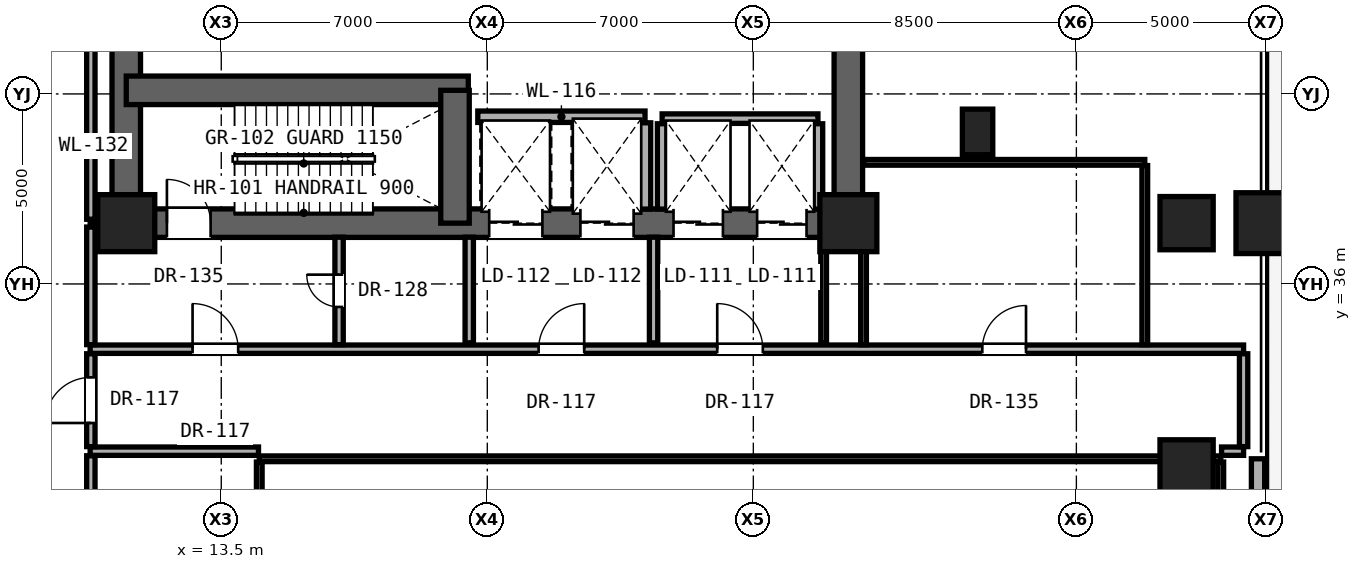
"""IFC4 building model, lengths in metres.
Left out: names, types, materials, properties, quantities, classifications, styles, units other than length and angle.
Written with IfcOpenShell. Run it as: python <this file> out.ifc"""

import sys

from ifc_helpers import new_model, si_unit, direction, frame, frame_2d, origin, origin_2d, place, context, subcontext, project, spatial, rectangle, hollow_rectangle, extrude, element, fill, save


model = new_model("IFC4")
c1 = context("Model", 3, precision=1e-05, world=origin(), true_north=direction((0.0, 1.0)))
c2 = subcontext(c1, "Body", "Model", "MODEL_VIEW")
j1 = project(units=[si_unit("LENGTHUNIT", "METRE"), si_unit("PLANEANGLEUNIT", "RADIAN")], contexts=[c1])
p1 = place(None, origin())
s1 = spatial("IfcSite", under=j1, at=p1, CompositionType="ELEMENT")
p2 = place(p1, origin())
s2 = spatial("IfcBuilding", under=s1, at=p2, CompositionType="ELEMENT")
p3 = place(p2, origin())
s3 = spatial("IfcBuildingStorey", under=s2, at=p3, CompositionType="ELEMENT", Elevation=0.0)
for number, where, z_axis, x_axis in (
    (1, (11.0, 37.6, 0.0), (0.0, 0.0, 1.0), (1.0, 0.0, 0.0)),
    (2, (30.0, 37.6, 0.0), (0.0, 0.0, 1.0), (1.0, 0.0, 0.0)),
):
    element("IfcColumn", number, at=place(p3, frame(where, z_axis=z_axis, x_axis=x_axis)), inside=s3, PredefinedType="COLUMN", context=c2, shape_type="SweptSolid", body=[
        extrude(rectangle(XDim=1.5, YDim=1.5, at=origin_2d()), origin(), (0.0, 0.0, 1.0), 5.2),
    ])
for number, where, z_axis, x_axis in (
    (3, (38.9, 31.2, 0.0), (0.0, 0.0, 1.0), (1.0, 0.0, 0.0)),
    (4, (38.9, 37.6, 0.0), (0.0, 0.0, 1.0), (1.0, 0.0, 0.0)),
):
    element("IfcColumn", number, at=place(p3, frame(where, z_axis=z_axis, x_axis=x_axis)), inside=s3, PredefinedType="COLUMN", context=c2, shape_type="SweptSolid", body=[
        extrude(hollow_rectangle(XDim=1.4, YDim=1.4, WallThickness=0.08, at=origin_2d()), origin(), (0.0, 0.0, 1.0), 5.2),
    ])
p4 = place(p3, frame((33.4, 40.0, 0.0), z_axis=(0.0, 0.0, 1.0), x_axis=(1.0, 0.0, 0.0)))
e5 = element("IfcColumn", 5, at=p4, inside=s3, PredefinedType="PILASTER", context=c2, shape_type="SweptSolid", body=[
    extrude(rectangle(XDim=0.8, YDim=1.2, at=origin_2d()), origin(), (0.0, 0.0, 1.0), 5.2),
])
for number, where, z_axis, x_axis in (
    (6, (11.0, 37.6, 0.0), (0.0, 0.0, 1.0), (0.0, 1.0, 0.0)),
    (7, (30.0, 37.6, 0.0), (0.0, 0.0, 1.0), (0.0, 1.0, 0.0)),
):
    element("IfcWall", number, at=place(p3, frame(where, z_axis=z_axis, x_axis=x_axis)), inside=s3, PredefinedType="SHEAR", context=c2, shape_type="SweptSolid", body=[
        extrude(rectangle(XDim=6.0, YDim=0.75, at=frame_2d((3.0, 0.0))), origin(), (0.0, 0.0, 1.0), 4.88),
    ])
p5 = place(p3, frame((11.0, 37.6, 0.0), z_axis=(0.0, 0.0, 1.0), x_axis=(1.0, 0.0, 0.0)))
e8 = element("IfcWall", 8, at=p5, inside=s3, PredefinedType="SHEAR", context=c2, shape_type="SweptSolid", body=[
    extrude(rectangle(XDim=19.0, YDim=0.75, at=frame_2d((9.5, 0.0))), origin(), (0.0, 0.0, 1.0), 4.88),
])
p6 = place(p5, frame((1.07, 0.0, 0.0)))
e9 = element("IfcOpeningElement", 9, at=p6, cuts=e8, PredefinedType="OPENING", context=c2, shape_type="SweptSolid", body=[
    extrude(rectangle(XDim=1.15, YDim=2.2, at=frame_2d((0.575, 1.1))), frame((0.0, 0.385, 0.0), z_axis=(0.0, -1.0, 0.0), x_axis=(1.0, 0.0, 0.0)), (0.0, 0.0, 1.0), 0.77),
])
p7 = place(p5, frame((9.55, 0.0, 0.0)))
e10 = element("IfcOpeningElement", 10, at=p7, cuts=e8, PredefinedType="OPENING", context=c2, shape_type="SweptSolid", body=[
    extrude(rectangle(XDim=1.4, YDim=2.35, at=frame_2d((0.7, 1.175))), frame((0.0, 0.385, 0.0), z_axis=(0.0, -1.0, 0.0), x_axis=(1.0, 0.0, 0.0)), (0.0, 0.0, 1.0), 0.77),
])
p8 = place(p5, frame((11.95, 0.0, 0.0)))
e11 = element("IfcOpeningElement", 11, at=p8, cuts=e8, PredefinedType="OPENING", context=c2, shape_type="SweptSolid", body=[
    extrude(rectangle(XDim=1.4, YDim=2.35, at=frame_2d((0.7, 1.175))), frame((0.0, 0.385, 0.0), z_axis=(0.0, -1.0, 0.0), x_axis=(1.0, 0.0, 0.0)), (0.0, 0.0, 1.0), 0.77),
])
p9 = place(p5, frame((14.4, 0.0, 0.0)))
e12 = element("IfcOpeningElement", 12, at=p9, cuts=e8, PredefinedType="OPENING", context=c2, shape_type="SweptSolid", body=[
    extrude(rectangle(XDim=1.3, YDim=2.3, at=frame_2d((0.65, 1.15))), frame((0.0, 0.385, 0.0), z_axis=(0.0, -1.0, 0.0), x_axis=(1.0, 0.0, 0.0)), (0.0, 0.0, 1.0), 0.77),
])
p10 = place(p5, frame((16.6, 0.0, 0.0)))
e13 = element("IfcOpeningElement", 13, at=p10, cuts=e8, PredefinedType="OPENING", context=c2, shape_type="SweptSolid", body=[
    extrude(rectangle(XDim=1.3, YDim=2.3, at=frame_2d((0.65, 1.15))), frame((0.0, 0.385, 0.0), z_axis=(0.0, -1.0, 0.0), x_axis=(1.0, 0.0, 0.0)), (0.0, 0.0, 1.0), 0.77),
])
p11 = place(p3, frame((11.0, 41.095, 0.0), z_axis=(0.0, 0.0, 1.0), x_axis=(1.0, 0.0, 0.0)))
e14 = element("IfcWall", 14, at=p11, inside=s3, PredefinedType="SHEAR", context=c2, shape_type="SweptSolid", body=[
    extrude(rectangle(XDim=9.0, YDim=0.75, at=frame_2d((4.5, 0.0))), origin(), (0.0, 0.0, 1.0), 4.88),
])
p12 = place(p3, frame((19.65, 37.6, 0.0), z_axis=(0.0, 0.0, 1.0), x_axis=(0.0, 1.0, 0.0)))
e15 = element("IfcWall", 15, at=p12, inside=s3, PredefinedType="SHEAR", context=c2, shape_type="SweptSolid", body=[
    extrude(rectangle(XDim=3.495, YDim=0.75, at=frame_2d((1.748, 0.0))), origin(), (0.0, 0.0, 1.0), 4.88),
])
p13 = place(p3, frame((41.0, 37.6, 0.0), z_axis=(0.0, 0.0, 1.0), x_axis=(1.0, 0.0, 0.0)))
e16 = element("IfcColumn", 16, at=p13, inside=s3, PredefinedType="COLUMN", context=c2, shape_type="SweptSolid", body=[
    extrude(rectangle(XDim=1.6, YDim=1.6, at=origin_2d()), origin(), (0.0, 0.0, 1.0), 5.2),
])
p14 = place(p3, frame((40.78, 31.4, 0.0), z_axis=(0.0, 0.0, 1.0), x_axis=(0.0, -1.0, 0.0)))
e17 = element("IfcWall", 17, at=p14, inside=s3, PredefinedType="SOLIDWALL", context=c2, shape_type="SweptSolid", body=[
    extrude(rectangle(XDim=10.8, YDim=0.35, at=frame_2d((5.4, 0.0))), origin(), (0.0, 0.0, 1.0), 3.832),
])
p15 = place(p14, frame((2.2, 0.0, 0.0)))
e18 = element("IfcOpeningElement", 18, at=p15, cuts=e17, PredefinedType="OPENING", context=c2, shape_type="SweptSolid", body=[
    extrude(rectangle(XDim=2.4, YDim=2.7, at=frame_2d((1.2, 1.35))), frame((0.0, 0.185, 0.0), z_axis=(0.0, -1.0, 0.0), x_axis=(1.0, 0.0, 0.0)), (0.0, 0.0, 1.0), 0.37),
])
p16 = place(p14, frame((6.8, 0.0, 0.0)))
e19 = element("IfcOpeningElement", 19, at=p16, cuts=e17, PredefinedType="OPENING", context=c2, shape_type="SweptSolid", body=[
    extrude(rectangle(XDim=1.8, YDim=2.5, at=frame_2d((0.9, 1.25))), frame((0.0, 0.185, 0.0), z_axis=(0.0, -1.0, 0.0), x_axis=(1.0, 0.0, 0.0)), (0.0, 0.0, 1.0), 0.37),
])
p17 = place(p3, frame((14.5, 31.4, 0.0), z_axis=(0.0, 0.0, 1.0), x_axis=(1.0, 0.0, 0.0)))
e20 = element("IfcWall", 20, at=p17, inside=s3, PredefinedType="PARTITIONING", context=c2, shape_type="SweptSolid", body=[
    extrude(rectangle(XDim=25.3, YDim=0.15, at=frame_2d((12.65, 0.0))), origin(), (0.0, 0.0, 1.0), 3.832),
])
p18 = place(p3, frame((10.05, 31.6, 0.0), z_axis=(0.0, 0.0, 1.0), x_axis=(1.0, 0.0, 0.0)))
e21 = element("IfcWall", 21, at=p18, inside=s3, PredefinedType="SOLIDWALL", context=c2, shape_type="SweptSolid", body=[
    extrude(rectangle(XDim=4.43, YDim=0.22, at=frame_2d((2.215, 0.0))), origin(), (0.0, 0.0, 1.0), 3.832),
])
p19 = place(p3, frame((39.82, 31.6, 0.0), z_axis=(0.0, 0.0, 1.0), x_axis=(1.0, 0.0, 0.0)))
e22 = element("IfcWall", 22, at=p19, inside=s3, PredefinedType="SOLIDWALL", context=c2, shape_type="SweptSolid", body=[
    extrude(rectangle(XDim=0.58, YDim=0.22, at=frame_2d((0.29, 0.0))), origin(), (0.0, 0.0, 1.0), 4.88),
])
p20 = place(p3, frame((10.05, 34.283, 0.0), z_axis=(0.0, 0.0, 1.0), x_axis=(1.0, 0.0, 0.0)))
e23 = element("IfcWall", 23, at=p20, inside=s3, PredefinedType="SOLIDWALL", context=c2, shape_type="SweptSolid", body=[
    extrude(rectangle(XDim=30.35, YDim=0.22, at=frame_2d((15.175, 0.0))), origin(), (0.0, 0.0, 1.0), 3.832),
])
p21 = place(p20, frame((2.695, 0.0, 0.0)))
e24 = element("IfcOpeningElement", 24, at=p21, cuts=e23, PredefinedType="OPENING", context=c2, shape_type="SweptSolid", body=[
    extrude(rectangle(XDim=1.2, YDim=2.25, at=frame_2d((0.6, 1.125))), frame((0.0, 0.12, 0.0), z_axis=(0.0, -1.0, 0.0), x_axis=(1.0, 0.0, 0.0)), (0.0, 0.0, 1.0), 0.24),
])
p22 = place(p20, frame((11.8, 0.0, 0.0)))
e25 = element("IfcOpeningElement", 25, at=p22, cuts=e23, PredefinedType="OPENING", context=c2, shape_type="SweptSolid", body=[
    extrude(rectangle(XDim=1.2, YDim=2.25, at=frame_2d((0.6, 1.125))), frame((0.0, 0.12, 0.0), z_axis=(0.0, -1.0, 0.0), x_axis=(1.0, 0.0, 0.0)), (0.0, 0.0, 1.0), 0.24),
])
p23 = place(p20, frame((16.5, 0.0, 0.0)))
e26 = element("IfcOpeningElement", 26, at=p23, cuts=e23, PredefinedType="OPENING", context=c2, shape_type="SweptSolid", body=[
    extrude(rectangle(XDim=1.2, YDim=2.25, at=frame_2d((0.6, 1.125))), frame((0.0, 0.12, 0.0), z_axis=(0.0, -1.0, 0.0), x_axis=(1.0, 0.0, 0.0)), (0.0, 0.0, 1.0), 0.24),
])
p24 = place(p20, frame((23.475, 0.0, 0.0)))
e27 = element("IfcOpeningElement", 27, at=p24, cuts=e23, PredefinedType="OPENING", context=c2, shape_type="SweptSolid", body=[
    extrude(rectangle(XDim=1.15, YDim=2.2, at=frame_2d((0.575, 1.1))), frame((0.0, 0.12, 0.0), z_axis=(0.0, -1.0, 0.0), x_axis=(1.0, 0.0, 0.0)), (0.0, 0.0, 1.0), 0.24),
])
p25 = place(p3, frame((10.05, 37.6, 0.0), z_axis=(0.0, 0.0, 1.0), x_axis=(1.0, 0.0, 0.0)))
e28 = element("IfcWall", 28, at=p25, inside=s3, PredefinedType="SHEAR", context=c2, shape_type="SweptSolid", body=[
    extrude(rectangle(XDim=0.185, YDim=0.185, at=frame_2d((0.093, 0.0))), origin(), (0.0, 0.0, 1.0), 4.88),
])
p26 = place(p3, frame((30.4, 39.2, 0.0), z_axis=(0.0, 0.0, 1.0), x_axis=(1.0, 0.0, 0.0)))
e29 = element("IfcWall", 29, at=p26, inside=s3, PredefinedType="PARTITIONING", context=c2, shape_type="SweptSolid", body=[
    extrude(rectangle(XDim=7.4, YDim=0.15, at=frame_2d((3.7, 0.0))), origin(), (0.0, 0.0, 1.0), 4.256),
])
p27 = place(p3, frame((25.1, 40.35, 0.0), z_axis=(0.0, 0.0, 1.0), x_axis=(1.0, 0.0, 0.0)))
e30 = element("IfcWall", 30, at=p27, inside=s3, PredefinedType="SOLIDWALL", context=c2, shape_type="SweptSolid", body=[
    extrude(rectangle(XDim=4.1, YDim=0.25, at=frame_2d((2.05, 0.0))), origin(), (0.0, 0.0, 1.0), 4.88),
])
p28 = place(p3, frame((20.25, 40.4, 0.0), z_axis=(0.0, 0.0, 1.0), x_axis=(1.0, 0.0, 0.0)))
e31 = element("IfcWall", 31, at=p28, inside=s3, PredefinedType="SOLIDWALL", context=c2, shape_type="SweptSolid", body=[
    extrude(rectangle(XDim=4.4, YDim=0.3, at=frame_2d((2.2, 0.0))), origin(), (0.0, 0.0, 1.0), 4.88),
])
p29 = place(p3, frame((10.069, 23.685, 0.0), z_axis=(0.0, 0.0, 1.0), x_axis=(0.0, 1.0, 0.0)))
e32 = element("IfcWall", 32, at=p29, inside=s3, PredefinedType="SOLIDWALL", context=c2, shape_type="SweptSolid", body=[
    extrude(rectangle(XDim=7.795, YDim=0.22, at=frame_2d((3.897, 0.0))), origin(), (0.0, 0.0, 1.0), 4.099),
])
p30 = place(p3, frame((10.069, 31.72, 0.0), z_axis=(0.0, 0.0, 1.0), x_axis=(0.0, 1.0, 0.0)))
e33 = element("IfcWall", 33, at=p30, inside=s3, PredefinedType="SOLIDWALL", context=c2, shape_type="SweptSolid", body=[
    extrude(rectangle(XDim=2.443, YDim=0.22, at=frame_2d((1.222, 0.0))), origin(), (0.0, 0.0, 1.0), 4.88),
])
p31 = place(p30, frame((0.622, 0.0, 0.0)))
e34 = element("IfcOpeningElement", 34, at=p31, cuts=e33, PredefinedType="OPENING", context=c2, shape_type="SweptSolid", body=[
    extrude(rectangle(XDim=1.2, YDim=2.25, at=frame_2d((0.6, 1.125))), frame((0.0, 0.12, 0.0), z_axis=(0.0, -1.0, 0.0), x_axis=(1.0, 0.0, 0.0)), (0.0, 0.0, 1.0), 0.24),
])
p32 = place(p3, frame((10.069, 34.403, 0.0), z_axis=(0.0, 0.0, 1.0), x_axis=(0.0, 1.0, 0.0)))
e35 = element("IfcWall", 35, at=p32, inside=s3, PredefinedType="SOLIDWALL", context=c2, shape_type="SweptSolid", body=[
    extrude(rectangle(XDim=3.094, YDim=0.22, at=frame_2d((1.547, 0.0))), origin(), (0.0, 0.0, 1.0), 3.772),
])
p33 = place(p3, frame((10.069, 37.702, 0.0), z_axis=(0.0, 0.0, 1.0), x_axis=(0.0, 1.0, 0.0)))
e36 = element("IfcWall", 36, at=p33, inside=s3, PredefinedType="SOLIDWALL", context=c2, shape_type="SweptSolid", body=[
    extrude(rectangle(XDim=6.013, YDim=0.22, at=frame_2d((3.006, 0.0))), origin(), (0.0, 0.0, 1.0), 3.772),
])
p34 = place(p3, frame((14.5, 21.0, 0.0), z_axis=(0.0, 0.0, 1.0), x_axis=(0.0, 1.0, 0.0)))
e37 = element("IfcWall", 37, at=p34, inside=s3, PredefinedType="PARTITIONING", context=c2, shape_type="SweptSolid", body=[
    extrude(rectangle(XDim=10.315, YDim=0.15, at=frame_2d((5.157, 0.0))), origin(), (0.0, 0.0, 1.0), 3.832),
])
p35 = place(p3, frame((16.6, 34.403, 0.0), z_axis=(0.0, 0.0, 1.0), x_axis=(0.0, 1.0, 0.0)))
e38 = element("IfcWall", 38, at=p35, inside=s3, PredefinedType="SOLIDWALL", context=c2, shape_type="SweptSolid", body=[
    extrude(rectangle(XDim=2.827, YDim=0.22, at=frame_2d((1.413, 0.0))), origin(), (0.0, 0.0, 1.0), 4.88),
])
p36 = place(p35, frame((0.992, 0.0, 0.0)))
e39 = element("IfcOpeningElement", 39, at=p36, cuts=e38, PredefinedType="OPENING", context=c2, shape_type="SweptSolid", body=[
    extrude(rectangle(XDim=0.85, YDim=2.01, at=frame_2d((0.425, 1.005))), frame((0.0, 0.12, 0.0), z_axis=(0.0, -1.0, 0.0), x_axis=(1.0, 0.0, 0.0)), (0.0, 0.0, 1.0), 0.24),
])
p37 = place(p3, frame((20.025, 34.45, 0.0), z_axis=(0.0, 0.0, 1.0), x_axis=(0.0, 1.0, 0.0)))
e40 = element("IfcWall", 40, at=p37, inside=s3, PredefinedType="SOLIDWALL", context=c2, shape_type="SweptSolid", body=[
    extrude(rectangle(XDim=2.78, YDim=0.22, at=frame_2d((1.39, 0.0))), origin(), (0.0, 0.0, 1.0), 4.88),
])
p38 = place(p3, frame((24.65, 37.97, 0.0), z_axis=(0.0, 0.0, 1.0), x_axis=(0.0, 1.0, 0.0)))
e41 = element("IfcWall", 41, at=p38, inside=s3, PredefinedType="SOLIDWALL", context=c2, shape_type="SweptSolid", body=[
    extrude(rectangle(XDim=2.27, YDim=0.3, at=frame_2d((1.135, 0.0))), origin(), (0.0, 0.0, 1.0), 4.88),
])
p39 = place(p3, frame((24.875, 34.45, 0.0), z_axis=(0.0, 0.0, 1.0), x_axis=(0.0, 1.0, 0.0)))
e42 = element("IfcWall", 42, at=p39, inside=s3, PredefinedType="SOLIDWALL", context=c2, shape_type="SweptSolid", body=[
    extrude(rectangle(XDim=2.78, YDim=0.22, at=frame_2d((1.39, 0.0))), origin(), (0.0, 0.0, 1.0), 4.88),
])
p40 = place(p3, frame((25.1, 37.97, 0.0), z_axis=(0.0, 0.0, 1.0), x_axis=(0.0, 1.0, 0.0)))
e43 = element("IfcWall", 43, at=p40, inside=s3, PredefinedType="SOLIDWALL", context=c2, shape_type="SweptSolid", body=[
    extrude(rectangle(XDim=2.245, YDim=0.25, at=frame_2d((1.123, 0.0))), origin(), (0.0, 0.0, 1.0), 4.88),
])
p41 = place(p3, frame((29.35, 34.45, 0.0), z_axis=(0.0, 0.0, 1.0), x_axis=(0.0, 1.0, 0.0)))
e44 = element("IfcWall", 44, at=p41, inside=s3, PredefinedType="PARTITIONING", context=c2, shape_type="SweptSolid", body=[
    extrude(rectangle(XDim=2.78, YDim=0.15, at=frame_2d((1.39, 0.0))), origin(), (0.0, 0.0, 1.0), 4.88),
])
p42 = place(p3, frame((29.2, 37.97, 0.0), z_axis=(0.0, 0.0, 1.0), x_axis=(0.0, 1.0, 0.0)))
e45 = element("IfcWall", 45, at=p42, inside=s3, PredefinedType="SOLIDWALL", context=c2, shape_type="SweptSolid", body=[
    extrude(rectangle(XDim=2.245, YDim=0.25, at=frame_2d((1.123, 0.0))), origin(), (0.0, 0.0, 1.0), 4.88),
])
p43 = place(p3, frame((30.4, 34.403, 0.0), z_axis=(0.0, 0.0, 1.0), x_axis=(0.0, 1.0, 0.0)))
e46 = element("IfcWall", 46, at=p43, inside=s3, PredefinedType="PARTITIONING", context=c2, shape_type="SweptSolid", body=[
    extrude(rectangle(XDim=3.177, YDim=0.15, at=frame_2d((1.588, 0.0))), origin(), (0.0, 0.0, 1.0), 3.772),
])
p44 = place(p3, frame((37.8, 34.403, 0.0), z_axis=(0.0, 0.0, 1.0), x_axis=(0.0, 1.0, 0.0)))
e47 = element("IfcWall", 47, at=p44, inside=s3, PredefinedType="PARTITIONING", context=c2, shape_type="SweptSolid", body=[
    extrude(rectangle(XDim=4.712, YDim=0.15, at=frame_2d((2.356, 0.0))), origin(), (0.0, 0.0, 1.0), 3.772),
])
p45 = place(p3, frame((39.8, 21.0, 0.0), z_axis=(0.0, 0.0, 1.0), x_axis=(0.0, 1.0, 0.0)))
e48 = element("IfcWall", 48, at=p45, inside=s3, PredefinedType="PARTITIONING", context=c2, shape_type="SweptSolid", body=[
    extrude(rectangle(XDim=10.315, YDim=0.15, at=frame_2d((5.157, 0.0))), origin(), (0.0, 0.0, 1.0), 4.88),
])
p46 = place(p3, frame((40.4, 31.72, 0.0), z_axis=(0.0, 0.0, 1.0), x_axis=(0.0, 1.0, 0.0)))
e49 = element("IfcWall", 49, at=p46, inside=s3, PredefinedType="SOLIDWALL", context=c2, shape_type="SweptSolid", body=[
    extrude(rectangle(XDim=2.443, YDim=0.22, at=frame_2d((1.222, 0.0))), origin(), (0.0, 0.0, 1.0), 4.88),
])
p47 = place(p31, origin())
e50 = element("IfcDoor", 50, at=p47, inside=s3, OperationType="SINGLE_SWING_LEFT", PredefinedType="DOOR", context=c2, shape_type="SweptSolid", body=[
    extrude(rectangle(XDim=1.2, YDim=2.25, at=frame_2d((0.6, 1.125))), frame((0.0, 0.025, 0.0), z_axis=(0.0, -1.0, 0.0), x_axis=(1.0, 0.0, 0.0)), (0.0, 0.0, 1.0), 0.05),
])
fill(e34, e50)
p48 = place(p21, origin())
e51 = element("IfcDoor", 51, at=p48, inside=s3, OperationType="SINGLE_SWING_LEFT", PredefinedType="DOOR", context=c2, shape_type="SweptSolid", body=[
    extrude(rectangle(XDim=1.2, YDim=2.25, at=frame_2d((0.6, 1.125))), frame((0.0, 0.025, 0.0), z_axis=(0.0, -1.0, 0.0), x_axis=(1.0, 0.0, 0.0)), (0.0, 0.0, 1.0), 0.05),
])
fill(e24, e51)
p49 = place(p6, origin())
e52 = element("IfcDoor", 52, at=p49, inside=s3, OperationType="SINGLE_SWING_LEFT", PredefinedType="DOOR", context=c2, shape_type="SweptSolid", body=[
    extrude(rectangle(XDim=1.15, YDim=2.2, at=frame_2d((0.575, 1.1))), frame((0.0, 0.025, 0.0), z_axis=(0.0, -1.0, 0.0), x_axis=(1.0, 0.0, 0.0)), (0.0, 0.0, 1.0), 0.05),
])
fill(e9, e52)
p50 = place(p22, origin())
e53 = element("IfcDoor", 53, at=p50, inside=s3, OperationType="SINGLE_SWING_RIGHT", PredefinedType="DOOR", context=c2, shape_type="SweptSolid", body=[
    extrude(rectangle(XDim=1.2, YDim=2.25, at=frame_2d((0.6, 1.125))), frame((0.0, 0.025, 0.0), z_axis=(0.0, -1.0, 0.0), x_axis=(1.0, 0.0, 0.0)), (0.0, 0.0, 1.0), 0.05),
])
fill(e25, e53)
p51 = place(p23, origin())
e54 = element("IfcDoor", 54, at=p51, inside=s3, OperationType="SINGLE_SWING_LEFT", PredefinedType="DOOR", context=c2, shape_type="SweptSolid", body=[
    extrude(rectangle(XDim=1.2, YDim=2.25, at=frame_2d((0.6, 1.125))), frame((0.0, 0.025, 0.0), z_axis=(0.0, -1.0, 0.0), x_axis=(1.0, 0.0, 0.0)), (0.0, 0.0, 1.0), 0.05),
])
fill(e26, e54)
p52 = place(p36, origin())
e55 = element("IfcDoor", 55, at=p52, inside=s3, OperationType="SINGLE_SWING_RIGHT", PredefinedType="DOOR", context=c2, shape_type="SweptSolid", body=[
    extrude(rectangle(XDim=0.85, YDim=2.01, at=frame_2d((0.425, 1.005))), frame((0.0, 0.025, 0.0), z_axis=(0.0, -1.0, 0.0), x_axis=(1.0, 0.0, 0.0)), (0.0, 0.0, 1.0), 0.05),
])
fill(e39, e55)
p53 = place(p24, origin())
e56 = element("IfcDoor", 56, at=p53, inside=s3, OperationType="SINGLE_SWING_RIGHT", PredefinedType="DOOR", context=c2, shape_type="SweptSolid", body=[
    extrude(rectangle(XDim=1.15, YDim=2.2, at=frame_2d((0.575, 1.1))), frame((0.0, 0.025, 0.0), z_axis=(0.0, -1.0, 0.0), x_axis=(1.0, 0.0, 0.0)), (0.0, 0.0, 1.0), 0.05),
])
fill(e27, e56)
p54 = place(p7, origin())
e57 = element("IfcDoor", 57, at=p54, inside=s3, OperationType="DOUBLE_DOOR_SLIDING", PredefinedType="DOOR", context=c2, shape_type="SweptSolid", body=[
    extrude(rectangle(XDim=1.4, YDim=2.35, at=frame_2d((0.7, 1.175))), frame((0.0, 0.025, 0.0), z_axis=(0.0, -1.0, 0.0), x_axis=(1.0, 0.0, 0.0)), (0.0, 0.0, 1.0), 0.05),
])
fill(e10, e57)
p55 = place(p8, origin())
e58 = element("IfcDoor", 58, at=p55, inside=s3, OperationType="DOUBLE_DOOR_SLIDING", PredefinedType="DOOR", context=c2, shape_type="SweptSolid", body=[
    extrude(rectangle(XDim=1.4, YDim=2.35, at=frame_2d((0.7, 1.175))), frame((0.0, 0.025, 0.0), z_axis=(0.0, -1.0, 0.0), x_axis=(1.0, 0.0, 0.0)), (0.0, 0.0, 1.0), 0.05),
])
fill(e11, e58)
p56 = place(p9, origin())
e59 = element("IfcDoor", 59, at=p56, inside=s3, OperationType="DOUBLE_DOOR_SLIDING", PredefinedType="DOOR", context=c2, shape_type="SweptSolid", body=[
    extrude(rectangle(XDim=1.3, YDim=2.3, at=frame_2d((0.65, 1.15))), frame((0.0, 0.025, 0.0), z_axis=(0.0, -1.0, 0.0), x_axis=(1.0, 0.0, 0.0)), (0.0, 0.0, 1.0), 0.05),
])
fill(e12, e59)
p57 = place(p10, origin())
e60 = element("IfcDoor", 60, at=p57, inside=s3, OperationType="DOUBLE_DOOR_SLIDING", PredefinedType="DOOR", context=c2, shape_type="SweptSolid", body=[
    extrude(rectangle(XDim=1.3, YDim=2.3, at=frame_2d((0.65, 1.15))), frame((0.0, 0.025, 0.0), z_axis=(0.0, -1.0, 0.0), x_axis=(1.0, 0.0, 0.0)), (0.0, 0.0, 1.0), 0.05),
])
fill(e13, e60)
save(model, sys.argv[1])
